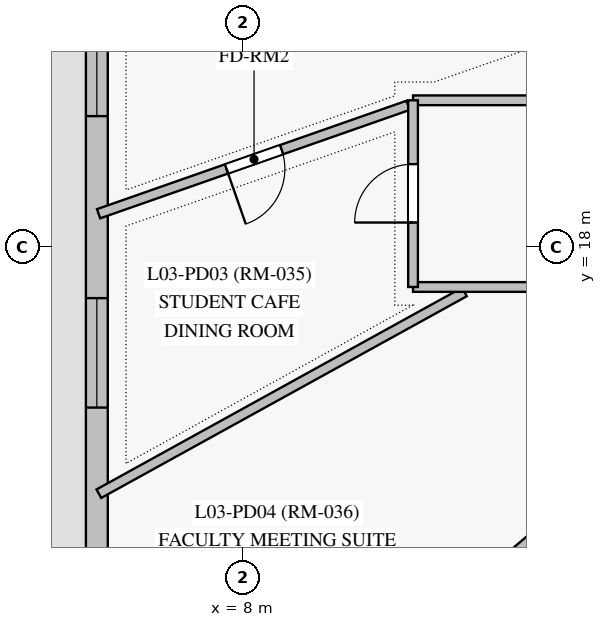
"""IFC4 building model, lengths in metres.
Left out: names, types, materials, properties, quantities, classifications, styles, units other than length and angle.
Written with IfcOpenShell. Run it as: python <this file> out.ifc"""

import sys

from ifc_helpers import new_model, si_unit, direction, frame, frame_2d, origin, origin_with_axes, place, context, subcontext, project, spatial, rectangle, extrude, source, transform, mapped, element, fill, save


model = new_model("IFC4")
c1 = context("Model", 3, precision=1e-05, world=origin(), true_north=direction((0.0, 1.0)))
c2 = subcontext(c1, "Body", "Model", "MODEL_VIEW")
j1 = project(units=[si_unit("LENGTHUNIT", "METRE"), si_unit("PLANEANGLEUNIT", "RADIAN")], contexts=[c1])
p1 = place(None, origin())
s1 = spatial("IfcSite", under=j1, at=p1, CompositionType="ELEMENT")
p2 = place(p1, origin())
s2 = spatial("IfcBuilding", under=s1, at=p2, CompositionType="ELEMENT")
p3 = place(p2, frame((0.0, 0.0, 13.5)))
s3 = spatial("IfcBuildingStorey", under=s2, at=p3, CompositionType="ELEMENT", Elevation=13.5)
p4 = place(p3, frame((5.6, 47.1, 0.0), z_axis=(0.0, 0.0, 1.0), x_axis=(0.0, -1.0, 0.0)))
e1 = element("IfcWall", 1, at=p4, inside=s3, PredefinedType="SOLIDWALL", context=c2, shape_type="SweptSolid", body=[
    extrude(rectangle(XDim=41.2, YDim=0.36, at=frame_2d((20.6, 0.0))), origin(), (0.0, 0.0, 1.0), 4.225),
])
p5 = place(p4, frame((1.008, 0.0, 0.85)))
e2 = element("IfcOpeningElement", 2, at=p5, cuts=e1, PredefinedType="OPENING", context=c2, shape_type="SweptSolid", body=[
    extrude(rectangle(XDim=1.8, YDim=2.2, at=frame_2d((0.9, 1.1))), frame((0.0, 0.19, 0.0), z_axis=(0.0, -1.0, 0.0), x_axis=(1.0, 0.0, 0.0)), (0.0, 0.0, 1.0), 0.38),
])
p6 = place(p4, frame((4.773, 0.0, 0.85)))
e3 = element("IfcOpeningElement", 3, at=p6, cuts=e1, PredefinedType="OPENING", context=c2, shape_type="SweptSolid", body=[
    extrude(rectangle(XDim=1.8, YDim=2.2, at=frame_2d((0.9, 1.1))), frame((0.0, 0.19, 0.0), z_axis=(0.0, -1.0, 0.0), x_axis=(1.0, 0.0, 0.0)), (0.0, 0.0, 1.0), 0.38),
])
p7 = place(p4, frame((8.381, 0.0, 0.85)))
e4 = element("IfcOpeningElement", 4, at=p7, cuts=e1, PredefinedType="OPENING", context=c2, shape_type="SweptSolid", body=[
    extrude(rectangle(XDim=1.8, YDim=2.2, at=frame_2d((0.9, 1.1))), frame((0.0, 0.19, 0.0), z_axis=(0.0, -1.0, 0.0), x_axis=(1.0, 0.0, 0.0)), (0.0, 0.0, 1.0), 0.38),
])
p8 = place(p4, frame((19.996, 0.0, 0.85)))
e5 = element("IfcOpeningElement", 5, at=p8, cuts=e1, PredefinedType="OPENING", context=c2, shape_type="SweptSolid", body=[
    extrude(rectangle(XDim=1.8, YDim=2.2, at=frame_2d((0.9, 1.1))), frame((0.0, 0.19, 0.0), z_axis=(0.0, -1.0, 0.0), x_axis=(1.0, 0.0, 0.0)), (0.0, 0.0, 1.0), 0.38),
])
p9 = place(p4, frame((25.14, 0.0, 0.85)))
e6 = element("IfcOpeningElement", 6, at=p9, cuts=e1, PredefinedType="OPENING", context=c2, shape_type="SweptSolid", body=[
    extrude(rectangle(XDim=1.8, YDim=2.2, at=frame_2d((0.9, 1.1))), frame((0.0, 0.19, 0.0), z_axis=(0.0, -1.0, 0.0), x_axis=(1.0, 0.0, 0.0)), (0.0, 0.0, 1.0), 0.38),
])
p10 = place(p4, frame((29.933, 0.0, 0.85)))
e7 = element("IfcOpeningElement", 7, at=p10, cuts=e1, PredefinedType="OPENING", context=c2, shape_type="SweptSolid", body=[
    extrude(rectangle(XDim=1.8, YDim=2.2, at=frame_2d((0.9, 1.1))), frame((0.0, 0.19, 0.0), z_axis=(0.0, -1.0, 0.0), x_axis=(1.0, 0.0, 0.0)), (0.0, 0.0, 1.0), 0.38),
])
p11 = place(p4, frame((35.617, 0.0, 0.85)))
e8 = element("IfcOpeningElement", 8, at=p11, cuts=e1, PredefinedType="OPENING", context=c2, shape_type="SweptSolid", body=[
    extrude(rectangle(XDim=1.8, YDim=2.2, at=frame_2d((0.9, 1.1))), frame((0.0, 0.19, 0.0), z_axis=(0.0, -1.0, 0.0), x_axis=(1.0, 0.0, 0.0)), (0.0, 0.0, 1.0), 0.38),
])
p12 = place(p4, frame((13.208, 0.0, 0.0)))
e9 = element("IfcOpeningElement", 9, at=p12, cuts=e1, PredefinedType="OPENING", context=c2, shape_type="SweptSolid", body=[
    extrude(rectangle(XDim=1.05, YDim=2.12, at=frame_2d((0.525, 1.06))), frame((0.0, 0.19, 0.0), z_axis=(0.0, -1.0, 0.0), x_axis=(1.0, 0.0, 0.0)), (0.0, 0.0, 1.0), 0.38),
])
p13 = place(p3, frame((16.068, 16.027, 0.0), z_axis=(0.0, 0.0, 1.0), x_axis=(-0.762407725243, -0.647096948293, 0.0)))
e10 = element("IfcWall", 10, at=p13, inside=s3, PredefinedType="PARTITIONING", context=c2, shape_type="SweptSolid", body=[
    extrude(rectangle(XDim=13.677, YDim=0.16, at=frame_2d((6.839, 0.0))), origin(), (0.0, 0.0, 1.0), 4.225),
])
p14 = place(p13, frame((6.409, 0.0, 0.0)))
e11 = element("IfcOpeningElement", 11, at=p14, cuts=e10, PredefinedType="OPENING", context=c2, shape_type="SweptSolid", body=[
    extrude(rectangle(XDim=0.86, YDim=2.04, at=frame_2d((0.43, 1.02))), frame((0.0, 0.09, 0.0), z_axis=(0.0, -1.0, 0.0), x_axis=(1.0, 0.0, 0.0)), (0.0, 0.0, 1.0), 0.18),
])
p15 = place(p3, frame((17.894, 14.868, 0.0), z_axis=(0.0, 0.0, 1.0), x_axis=(-0.670944212542, -0.741507831149, 0.0)))
e12 = element("IfcWall", 12, at=p15, inside=s3, PredefinedType="PARTITIONING", context=c2, shape_type="SweptSolid", body=[
    extrude(rectangle(XDim=10.141, YDim=0.16, at=frame_2d((5.07, 0.0))), origin(), (0.0, 0.0, 1.0), 4.225),
])
p16 = place(p3, frame((11.645, 17.268, 0.0), z_axis=(0.0, 0.0, 1.0), x_axis=(-0.875543975617, -0.483138434365, 0.0)))
e13 = element("IfcWall", 13, at=p16, inside=s3, PredefinedType="PARTITIONING", context=c2, shape_type="SweptSolid", body=[
    extrude(rectangle(XDim=6.867, YDim=0.16, at=frame_2d((3.434, 0.0))), origin(), (0.0, 0.0, 1.0), 4.225),
])
p17 = place(p3, frame((10.718, 20.337, 0.0), z_axis=(0.0, 0.0, 1.0), x_axis=(-0.943803287207, -0.330507723142, 0.0)))
e14 = element("IfcWall", 14, at=p17, inside=s3, PredefinedType="PARTITIONING", context=c2, shape_type="SweptSolid", body=[
    extrude(rectangle(XDim=5.392, YDim=0.16, at=frame_2d((2.696, 0.0))), origin(), (0.0, 0.0, 1.0), 4.225),
])
p18 = place(p17, frame((2.204, 0.0, 0.0)))
e15 = element("IfcOpeningElement", 15, at=p18, cuts=e14, PredefinedType="OPENING", context=c2, shape_type="SweptSolid", body=[
    extrude(rectangle(XDim=0.96, YDim=2.15, at=frame_2d((0.48, 1.075))), frame((0.0, 0.09, 0.0), z_axis=(0.0, -1.0, 0.0), x_axis=(1.0, 0.0, 0.0)), (0.0, 0.0, 1.0), 0.18),
])
p19 = place(p3, frame((16.15, 17.35, 0.0), z_axis=(0.0, 0.0, 1.0), x_axis=(-1.0, 0.0, 0.0)))
e16 = element("IfcWall", 16, at=p19, inside=s3, PredefinedType="PARTITIONING", context=c2, shape_type="SweptSolid", body=[
    extrude(rectangle(XDim=5.35, YDim=0.16, at=frame_2d((2.675, 0.0))), origin(), (0.0, 0.0, 1.0), 4.225),
])
p20 = place(p19, frame((2.2, 0.0, 0.0)))
e17 = element("IfcOpeningElement", 17, at=p20, cuts=e16, PredefinedType="OPENING", context=c2, shape_type="SweptSolid", body=[
    extrude(rectangle(XDim=0.96, YDim=2.15, at=frame_2d((0.48, 1.075))), frame((0.0, 0.09, 0.0), z_axis=(0.0, -1.0, 0.0), x_axis=(1.0, 0.0, 0.0)), (0.0, 0.0, 1.0), 0.18),
])
p21 = place(p3, frame((10.8, 20.42, 0.0), z_axis=(0.0, 0.0, 1.0), x_axis=(1.0, 0.0, 0.0)))
e18 = element("IfcWall", 18, at=p21, inside=s3, PredefinedType="PARTITIONING", context=c2, shape_type="SweptSolid", body=[
    extrude(rectangle(XDim=5.35, YDim=0.16, at=frame_2d((2.675, 0.0))), origin(), (0.0, 0.0, 1.0), 3.275),
])
p22 = place(p3, frame((10.8, 17.35, 0.0), z_axis=(0.0, 0.0, 1.0), x_axis=(0.0, 1.0, 0.0)))
e19 = element("IfcWall", 19, at=p22, inside=s3, PredefinedType="PARTITIONING", context=c2, shape_type="SweptSolid", body=[
    extrude(rectangle(XDim=3.07, YDim=0.16, at=frame_2d((1.535, 0.0))), origin(), (0.0, 0.0, 1.0), 3.275),
])
p23 = place(p22, frame((1.06, 0.0, 0.0)))
e20 = element("IfcOpeningElement", 20, at=p23, cuts=e19, PredefinedType="OPENING", context=c2, shape_type="SweptSolid", body=[
    extrude(rectangle(XDim=0.96, YDim=2.15, at=frame_2d((0.48, 1.075))), frame((0.0, 0.09, 0.0), z_axis=(0.0, -1.0, 0.0), x_axis=(1.0, 0.0, 0.0)), (0.0, 0.0, 1.0), 0.18),
])
m1 = source(origin_with_axes(), c2, "Body", "SweptSolid", [
    extrude(rectangle(XDim=1.8, YDim=2.2, at=frame_2d((0.9, 1.1))), frame((0.0, 0.03, 0.0), z_axis=(0.0, -1.0, 0.0), x_axis=(1.0, 0.0, 0.0)), (0.0, 0.0, 1.0), 0.06),
])
p24 = place(p9, origin())
e21 = element("IfcWindow", 21, at=p24, inside=s3, PartitioningType="SINGLE_PANEL", PredefinedType="WINDOW", context=c2, shape_type="MappedRepresentation", body=[
    mapped(m1, transform((0.0, 0.0, 0.0), scale=1.0)),
])
fill(e6, e21)
p25 = place(p10, origin())
e22 = element("IfcWindow", 22, at=p25, inside=s3, PartitioningType="SINGLE_PANEL", PredefinedType="WINDOW", context=c2, shape_type="MappedRepresentation", body=[
    mapped(m1, transform((0.0, 0.0, 0.0), scale=1.0)),
])
fill(e7, e22)
m2 = source(origin_with_axes(), c2, "Body", "SweptSolid", [
    extrude(rectangle(XDim=0.96, YDim=2.15, at=frame_2d((0.48, 1.075))), frame((0.0, 0.025, 0.0), z_axis=(0.0, -1.0, 0.0), x_axis=(1.0, 0.0, 0.0)), (0.0, 0.0, 1.0), 0.05),
])
p26 = place(p18, origin())
e23 = element("IfcDoor", 23, at=p26, inside=s3, OperationType="SINGLE_SWING_RIGHT", PredefinedType="DOOR", context=c2, shape_type="MappedRepresentation", body=[
    mapped(m2, transform((0.0, 0.0, 0.0), scale=1.0)),
])
fill(e15, e23)
p27 = place(p23, origin())
e24 = element("IfcDoor", 24, at=p27, inside=s3, OperationType="SINGLE_SWING_LEFT", PredefinedType="DOOR", context=c2, shape_type="MappedRepresentation", body=[
    mapped(m2, transform((0.0, 0.0, 0.0), scale=1.0)),
])
fill(e20, e24)
save(model, sys.argv[1])
